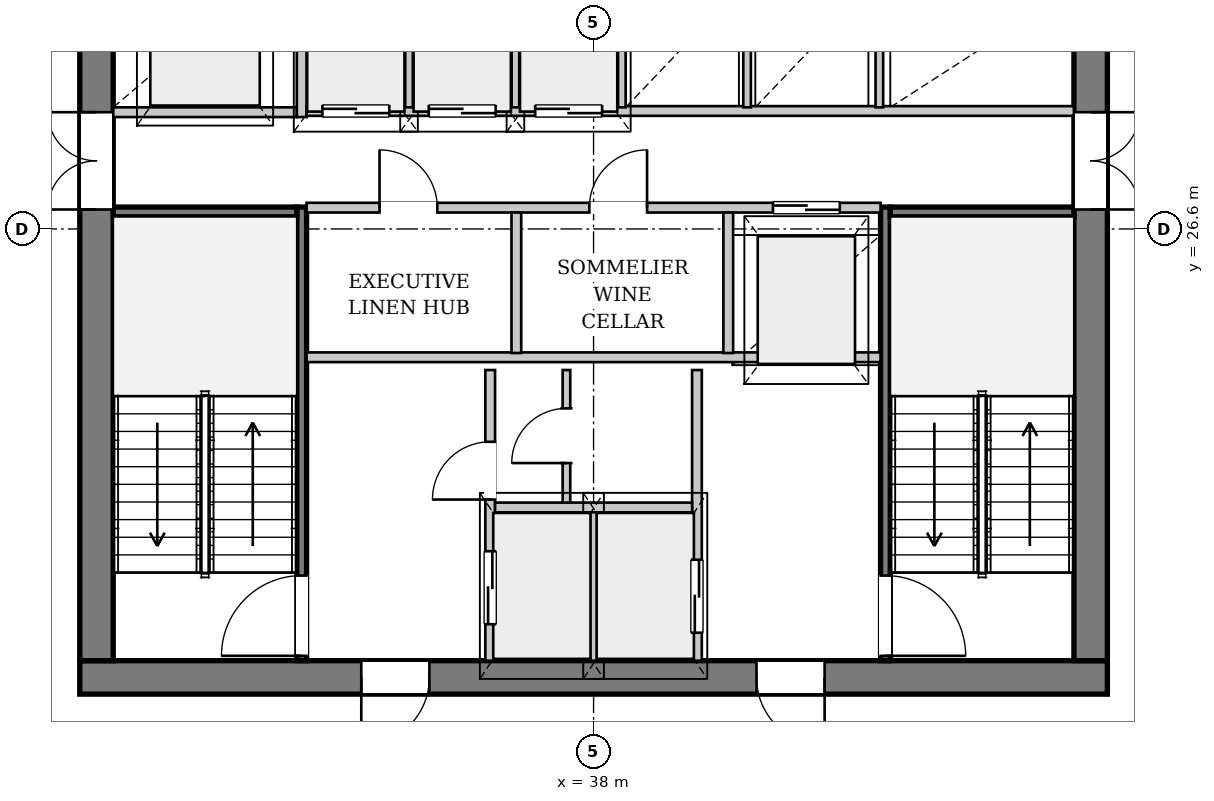
"""IFC4 building model, lengths in metres.
Left out: names, types, materials, properties, quantities, classifications, styles, units other than length and angle.
Written with IfcOpenShell. Run it as: python <this file> out.ifc"""

import sys

from ifc_helpers import new_model, si_unit, direction, frame, frame_2d, origin, place, context, subcontext, project, spatial, rectangle, extrude, source, transform, mapped, element, fill, save


model = new_model("IFC4")
c1 = context("Model", 3, precision=1e-05, world=origin(), true_north=direction((0.0, 1.0)))
c2 = subcontext(c1, "Body", "Model", "MODEL_VIEW")
j1 = project(units=[si_unit("LENGTHUNIT", "METRE"), si_unit("PLANEANGLEUNIT", "RADIAN")], contexts=[c1])
p1 = place(None, origin())
s1 = spatial("IfcSite", under=j1, at=p1, CompositionType="ELEMENT")
p2 = place(p1, origin())
s2 = spatial("IfcBuilding", under=s1, at=p2, CompositionType="ELEMENT")
p3 = place(p2, frame((0.0, 0.0, 157.25)))
s3 = spatial("IfcBuildingStorey", under=s2, at=p3, CompositionType="ELEMENT", Elevation=157.25)
p4 = place(p3, frame((52.85, 18.94, 0.0), z_axis=(0.0, 0.0, 1.0), x_axis=(-0.714884953244, -0.699242092287, 0.0)))
e1 = element("IfcWall", 1, at=p4, inside=s3, PredefinedType="SOLIDWALL", context=c2, shape_type="SweptSolid", body=[
    extrude(rectangle(XDim=23.598, YDim=0.32, at=frame_2d((11.799, 0.0))), origin(), (0.0, 0.0, 1.0), 2.722),
])
p5 = place(p4, frame((6.801, 0.0, 0.0)))
e2 = element("IfcOpeningElement", 2, at=p5, cuts=e1, PredefinedType="OPENING", context=c2, shape_type="SweptSolid", body=[
    extrude(rectangle(XDim=1.5, YDim=2.3, at=frame_2d((0.75, 1.15))), frame((0.0, 0.17, 0.0), z_axis=(0.0, -1.0, 0.0), x_axis=(1.0, 0.0, 0.0)), (0.0, 0.0, 1.0), 0.34),
])
p6 = place(p4, frame((16.163, 0.0, 0.252)))
e3 = element("IfcOpeningElement", 3, at=p6, cuts=e1, PredefinedType="OPENING", context=c2, shape_type="SweptSolid", body=[
    extrude(rectangle(XDim=2.6, YDim=2.35, at=frame_2d((1.3, 1.175))), frame((0.0, 0.17, 0.0), z_axis=(0.0, -1.0, 0.0), x_axis=(1.0, 0.0, 0.0)), (0.0, 0.0, 1.0), 0.34),
])
p7 = place(p3, frame((46.45, 19.225, 0.0), z_axis=(0.0, 0.0, 1.0), x_axis=(-1.0, 0.0, 0.0)))
e4 = element("IfcWall", 4, at=p7, inside=s3, PredefinedType="SHEAR", context=c2, shape_type="SweptSolid", body=[
    extrude(rectangle(XDim=16.9, YDim=0.55, at=frame_2d((8.45, 0.0))), origin(), (0.0, 0.0, 1.0), 3.33),
])
p8 = place(p7, frame((4.65, 0.0, 0.0)))
e5 = element("IfcOpeningElement", 5, at=p8, cuts=e4, PredefinedType="OPENING", context=c2, shape_type="SweptSolid", body=[
    extrude(rectangle(XDim=1.12, YDim=2.25, at=frame_2d((0.56, 1.125))), frame((0.0, 0.285, 0.0), z_axis=(0.0, -1.0, 0.0), x_axis=(1.0, 0.0, 0.0)), (0.0, 0.0, 1.0), 0.57),
])
p9 = place(p7, frame((11.15, 0.0, 0.0)))
e6 = element("IfcOpeningElement", 6, at=p9, cuts=e4, PredefinedType="OPENING", context=c2, shape_type="SweptSolid", body=[
    extrude(rectangle(XDim=1.12, YDim=2.25, at=frame_2d((0.56, 1.125))), frame((0.0, 0.285, 0.0), z_axis=(0.0, -1.0, 0.0), x_axis=(1.0, 0.0, 0.0)), (0.0, 0.0, 1.0), 0.57),
])
p10 = place(p3, frame((29.825, 19.5, 0.0), z_axis=(0.0, 0.0, 1.0), x_axis=(0.0, 1.0, 0.0)))
e7 = element("IfcWall", 7, at=p10, inside=s3, PredefinedType="SHEAR", context=c2, shape_type="SweptSolid", body=[
    extrude(rectangle(XDim=14.2, YDim=0.55, at=frame_2d((7.1, 0.0))), origin(), (0.0, 0.0, 1.0), 3.33),
])
p11 = place(p10, frame((7.42, 0.0, 0.0)))
e8 = element("IfcOpeningElement", 8, at=p11, cuts=e7, PredefinedType="OPENING", context=c2, shape_type="SweptSolid", body=[
    extrude(rectangle(XDim=1.6, YDim=2.2, at=frame_2d((0.8, 1.1))), frame((0.0, 0.285, 0.0), z_axis=(0.0, -1.0, 0.0), x_axis=(1.0, 0.0, 0.0)), (0.0, 0.0, 1.0), 0.57),
])
p12 = place(p3, frame((46.175, 33.7, 0.0), z_axis=(0.0, 0.0, 1.0), x_axis=(0.0, -1.0, 0.0)))
e9 = element("IfcWall", 9, at=p12, inside=s3, PredefinedType="SHEAR", context=c2, shape_type="SweptSolid", body=[
    extrude(rectangle(XDim=14.2, YDim=0.55, at=frame_2d((7.1, 0.0))), origin(), (0.0, 0.0, 1.0), 3.33),
])
p13 = place(p12, frame((5.18, 0.0, 0.0)))
e10 = element("IfcOpeningElement", 10, at=p13, cuts=e9, PredefinedType="OPENING", context=c2, shape_type="SweptSolid", body=[
    extrude(rectangle(XDim=1.6, YDim=2.2, at=frame_2d((0.8, 1.1))), frame((0.0, 0.285, 0.0), z_axis=(0.0, -1.0, 0.0), x_axis=(1.0, 0.0, 0.0)), (0.0, 0.0, 1.0), 0.57),
])
p14 = place(p12, frame((2.05, 0.0, 0.0)))
e11 = element("IfcOpeningElement", 11, at=p14, cuts=e9, PredefinedType="OPENING", context=c2, shape_type="SweptSolid", body=[
    extrude(rectangle(XDim=0.95, YDim=2.1, at=frame_2d((0.475, 1.05))), frame((0.0, 0.285, 0.0), z_axis=(0.0, -1.0, 0.0), x_axis=(1.0, 0.0, 0.0)), (0.0, 0.0, 1.0), 0.57),
])
p15 = place(p3, frame((33.2, 19.5, 0.0), z_axis=(0.0, 0.0, 1.0), x_axis=(0.0, 1.0, 0.0)))
e12 = element("IfcWall", 12, at=p15, inside=s3, PredefinedType="PARTITIONING", context=c2, shape_type="SweptSolid", body=[
    extrude(rectangle(XDim=7.46, YDim=0.16, at=frame_2d((3.73, 0.0))), origin(), (0.0, 0.0, 1.0), 3.33),
])
p16 = place(p15, frame((0.08, 0.0, 0.0)))
e13 = element("IfcOpeningElement", 13, at=p16, cuts=e12, PredefinedType="OPENING", context=c2, shape_type="SweptSolid", body=[
    extrude(rectangle(XDim=1.32, YDim=2.2, at=frame_2d((0.66, 1.1))), frame((0.0, 0.09, 0.0), z_axis=(0.0, -1.0, 0.0), x_axis=(1.0, 0.0, 0.0)), (0.0, 0.0, 1.0), 0.18),
])
p17 = place(p3, frame((30.1, 26.88, 0.0), z_axis=(0.0, 0.0, 1.0), x_axis=(1.0, 0.0, 0.0)))
e14 = element("IfcWall", 14, at=p17, inside=s3, PredefinedType="PARTITIONING", context=c2, shape_type="SweptSolid", body=[
    extrude(rectangle(XDim=3.02, YDim=0.16, at=frame_2d((1.51, 0.0))), origin(), (0.0, 0.0, 1.0), 3.33),
])
p18 = place(p3, frame((42.8, 26.96, 0.0), z_axis=(0.0, 0.0, 1.0), x_axis=(0.0, -1.0, 0.0)))
e15 = element("IfcWall", 15, at=p18, inside=s3, PredefinedType="PARTITIONING", context=c2, shape_type="SweptSolid", body=[
    extrude(rectangle(XDim=7.46, YDim=0.16, at=frame_2d((3.73, 0.0))), origin(), (0.0, 0.0, 1.0), 3.33),
])
p19 = place(p18, frame((6.06, 0.0, 0.0)))
e16 = element("IfcOpeningElement", 16, at=p19, cuts=e15, PredefinedType="OPENING", context=c2, shape_type="SweptSolid", body=[
    extrude(rectangle(XDim=1.32, YDim=2.2, at=frame_2d((0.66, 1.1))), frame((0.0, 0.09, 0.0), z_axis=(0.0, -1.0, 0.0), x_axis=(1.0, 0.0, 0.0)), (0.0, 0.0, 1.0), 0.18),
])
p20 = place(p3, frame((42.88, 26.88, 0.0), z_axis=(0.0, 0.0, 1.0), x_axis=(1.0, 0.0, 0.0)))
e17 = element("IfcWall", 17, at=p20, inside=s3, PredefinedType="PARTITIONING", context=c2, shape_type="SweptSolid", body=[
    extrude(rectangle(XDim=3.02, YDim=0.16, at=frame_2d((1.51, 0.0))), origin(), (0.0, 0.0, 1.0), 3.33),
])
p21 = place(p3, frame((36.3, 19.5, 0.0), z_axis=(0.0, 0.0, 1.0), x_axis=(0.0, 1.0, 0.0)))
e18 = element("IfcWall", 18, at=p21, inside=s3, PredefinedType="PARTITIONING", context=c2, shape_type="SweptSolid", body=[
    extrude(rectangle(XDim=4.78, YDim=0.16, at=frame_2d((2.39, 0.0))), origin(), (0.0, 0.0, 1.0), 3.33),
])
p22 = place(p21, frame((0.6, 0.0, 0.0)))
e19 = element("IfcOpeningElement", 19, at=p22, cuts=e18, PredefinedType="OPENING", context=c2, shape_type="SweptSolid", body=[
    extrude(rectangle(XDim=1.2, YDim=2.2, at=frame_2d((0.6, 1.1))), frame((0.0, 0.09, 0.0), z_axis=(0.0, -1.0, 0.0), x_axis=(1.0, 0.0, 0.0)), (0.0, 0.0, 1.0), 0.18),
])
p23 = place(p21, frame((2.65, 0.0, 0.0)))
e20 = element("IfcOpeningElement", 20, at=p23, cuts=e18, PredefinedType="OPENING", context=c2, shape_type="SweptSolid", body=[
    extrude(rectangle(XDim=0.95, YDim=2.1, at=frame_2d((0.475, 1.05))), frame((0.0, 0.09, 0.0), z_axis=(0.0, -1.0, 0.0), x_axis=(1.0, 0.0, 0.0)), (0.0, 0.0, 1.0), 0.18),
])
p24 = place(p3, frame((39.7, 24.28, 0.0), z_axis=(0.0, 0.0, 1.0), x_axis=(0.0, -1.0, 0.0)))
e21 = element("IfcWall", 21, at=p24, inside=s3, PredefinedType="PARTITIONING", context=c2, shape_type="SweptSolid", body=[
    extrude(rectangle(XDim=4.78, YDim=0.16, at=frame_2d((2.39, 0.0))), origin(), (0.0, 0.0, 1.0), 3.33),
])
p25 = place(p24, frame((3.12, 0.0, 0.0)))
e22 = element("IfcOpeningElement", 22, at=p25, cuts=e21, PredefinedType="OPENING", context=c2, shape_type="SweptSolid", body=[
    extrude(rectangle(XDim=1.2, YDim=2.2, at=frame_2d((0.6, 1.1))), frame((0.0, 0.09, 0.0), z_axis=(0.0, -1.0, 0.0), x_axis=(1.0, 0.0, 0.0)), (0.0, 0.0, 1.0), 0.18),
])
p26 = place(p3, frame((38.0, 19.5, 0.0), z_axis=(0.0, 0.0, 1.0), x_axis=(0.0, 1.0, 0.0)))
e23 = element("IfcWall", 23, at=p26, inside=s3, PredefinedType="PARTITIONING", context=c2, shape_type="SweptSolid", body=[
    extrude(rectangle(XDim=2.46, YDim=0.125, at=frame_2d((1.23, 0.0))), origin(), (0.0, 0.0, 1.0), 3.33),
])
p27 = place(p3, frame((36.38, 22.02, 0.0), z_axis=(0.0, 0.0, 1.0), x_axis=(1.0, 0.0, 0.0)))
e24 = element("IfcWall", 24, at=p27, inside=s3, PredefinedType="PARTITIONING", context=c2, shape_type="SweptSolid", body=[
    extrude(rectangle(XDim=3.24, YDim=0.16, at=frame_2d((1.62, 0.0))), origin(), (0.0, 0.0, 1.0), 3.33),
])
p28 = place(p3, frame((33.28, 24.49, 0.0), z_axis=(0.0, 0.0, 1.0), x_axis=(1.0, 0.0, 0.0)))
e25 = element("IfcWall", 25, at=p28, inside=s3, PredefinedType="PARTITIONING", context=c2, shape_type="SweptSolid", body=[
    extrude(rectangle(XDim=9.44, YDim=0.16, at=frame_2d((4.72, 0.0))), origin(), (0.0, 0.0, 1.0), 3.33),
])
p29 = place(p3, frame((37.554, 22.1, 0.0), z_axis=(0.0, 0.0, 1.0), x_axis=(0.0, 1.0, 0.0)))
e26 = element("IfcWall", 26, at=p29, inside=s3, PredefinedType="PARTITIONING", context=c2, shape_type="SweptSolid", body=[
    extrude(rectangle(XDim=2.18, YDim=0.125, at=frame_2d((1.09, 0.0))), origin(), (0.0, 0.0, 1.0), 3.33),
])
p30 = place(p29, frame((0.65, 0.0, 0.0)))
e27 = element("IfcOpeningElement", 27, at=p30, cuts=e26, PredefinedType="OPENING", context=c2, shape_type="SweptSolid", body=[
    extrude(rectangle(XDim=0.9, YDim=2.1, at=frame_2d((0.45, 1.05))), frame((0.0, 0.073, 0.0), z_axis=(0.0, -1.0, 0.0), x_axis=(1.0, 0.0, 0.0)), (0.0, 0.0, 1.0), 0.145),
])
p31 = place(p3, frame((30.1, 28.52, 0.0), z_axis=(0.0, 0.0, 1.0), x_axis=(1.0, 0.0, 0.0)))
e28 = element("IfcWall", 28, at=p31, inside=s3, PredefinedType="PARTITIONING", context=c2, shape_type="SweptSolid", body=[
    extrude(rectangle(XDim=3.02, YDim=0.16, at=frame_2d((1.51, 0.0))), origin(), (0.0, 0.0, 1.0), 3.33),
])
p32 = place(p3, frame((33.2, 28.44, 0.0), z_axis=(0.0, 0.0, 1.0), x_axis=(0.0, 1.0, 0.0)))
e29 = element("IfcWall", 29, at=p32, inside=s3, PredefinedType="PARTITIONING", context=c2, shape_type="SweptSolid", body=[
    extrude(rectangle(XDim=5.26, YDim=0.16, at=frame_2d((2.63, 0.0))), origin(), (0.0, 0.0, 1.0), 3.33),
])
p33 = place(p3, frame((33.28, 26.95, 0.0), z_axis=(0.0, 0.0, 1.0), x_axis=(1.0, 0.0, 0.0)))
e30 = element("IfcWall", 30, at=p33, inside=s3, PredefinedType="PARTITIONING", context=c2, shape_type="SweptSolid", body=[
    extrude(rectangle(XDim=9.44, YDim=0.16, at=frame_2d((4.72, 0.0))), origin(), (0.0, 0.0, 1.0), 3.33),
])
p34 = place(p33, frame((1.2, 0.0, 0.0)))
e31 = element("IfcOpeningElement", 31, at=p34, cuts=e30, PredefinedType="OPENING", context=c2, shape_type="SweptSolid", body=[
    extrude(rectangle(XDim=0.95, YDim=2.1, at=frame_2d((0.475, 1.05))), frame((0.0, 0.09, 0.0), z_axis=(0.0, -1.0, 0.0), x_axis=(1.0, 0.0, 0.0)), (0.0, 0.0, 1.0), 0.18),
])
p35 = place(p33, frame((4.65, 0.0, 0.0)))
e32 = element("IfcOpeningElement", 32, at=p35, cuts=e30, PredefinedType="OPENING", context=c2, shape_type="SweptSolid", body=[
    extrude(rectangle(XDim=0.95, YDim=2.1, at=frame_2d((0.475, 1.05))), frame((0.0, 0.09, 0.0), z_axis=(0.0, -1.0, 0.0), x_axis=(1.0, 0.0, 0.0)), (0.0, 0.0, 1.0), 0.18),
])
p36 = place(p33, frame((7.67, 0.0, 0.0)))
e33 = element("IfcOpeningElement", 33, at=p36, cuts=e30, PredefinedType="OPENING", context=c2, shape_type="SweptSolid", body=[
    extrude(rectangle(XDim=1.1, YDim=2.2, at=frame_2d((0.55, 1.1))), frame((0.0, 0.09, 0.0), z_axis=(0.0, -1.0, 0.0), x_axis=(1.0, 0.0, 0.0)), (0.0, 0.0, 1.0), 0.18),
])
for number, where, z_axis, x_axis in (
    (34, (36.73, 24.56, 0.0), (0.0, 0.0, 1.0), (0.0, 1.0, 0.0)),
    (35, (40.215, 24.56, 0.0), (0.0, 0.0, 1.0), (0.0, 1.0, 0.0)),
):
    element("IfcWall", number, at=place(p3, frame(where, z_axis=z_axis, x_axis=x_axis)), inside=s3, PredefinedType="PARTITIONING", context=c2, shape_type="SweptSolid", body=[
        extrude(rectangle(XDim=2.31, YDim=0.16, at=frame_2d((1.155, 0.0))), origin(), (0.0, 0.0, 1.0), 3.33),
    ])
p37 = place(p3, frame((33.28, 28.54, 0.0), z_axis=(0.0, 0.0, 1.0), x_axis=(1.0, 0.0, 0.0)))
e36 = element("IfcWall", 36, at=p37, inside=s3, PredefinedType="PARTITIONING", context=c2, shape_type="SweptSolid", body=[
    extrude(rectangle(XDim=12.62, YDim=0.16, at=frame_2d((6.31, 0.0))), origin(), (0.0, 0.0, 1.0), 3.33),
])
p38 = place(p37, frame((0.26, 0.0, 0.0)))
e37 = element("IfcOpeningElement", 37, at=p38, cuts=e36, PredefinedType="OPENING", context=c2, shape_type="SweptSolid", body=[
    extrude(rectangle(XDim=1.1, YDim=2.2, at=frame_2d((0.55, 1.1))), frame((0.0, 0.09, 0.0), z_axis=(0.0, -1.0, 0.0), x_axis=(1.0, 0.0, 0.0)), (0.0, 0.0, 1.0), 0.18),
])
p39 = place(p37, frame((2.01, 0.0, 0.0)))
e38 = element("IfcOpeningElement", 38, at=p39, cuts=e36, PredefinedType="OPENING", context=c2, shape_type="SweptSolid", body=[
    extrude(rectangle(XDim=1.1, YDim=2.2, at=frame_2d((0.55, 1.1))), frame((0.0, 0.09, 0.0), z_axis=(0.0, -1.0, 0.0), x_axis=(1.0, 0.0, 0.0)), (0.0, 0.0, 1.0), 0.18),
])
p40 = place(p37, frame((3.76, 0.0, 0.0)))
e39 = element("IfcOpeningElement", 39, at=p40, cuts=e36, PredefinedType="OPENING", context=c2, shape_type="SweptSolid", body=[
    extrude(rectangle(XDim=1.1, YDim=2.2, at=frame_2d((0.55, 1.1))), frame((0.0, 0.09, 0.0), z_axis=(0.0, -1.0, 0.0), x_axis=(1.0, 0.0, 0.0)), (0.0, 0.0, 1.0), 0.18),
])
for number, where, z_axis, x_axis in (
    (40, (34.965, 28.6, 0.0), (0.0, 0.0, 1.0), (0.0, 1.0, 0.0)),
    (41, (36.715, 28.6, 0.0), (0.0, 0.0, 1.0), (0.0, 1.0, 0.0)),
    (42, (38.465, 28.6, 0.0), (0.0, 0.0, 1.0), (0.0, 1.0, 0.0)),
    (43, (40.525, 28.6, 0.0), (0.0, 0.0, 1.0), (0.0, 1.0, 0.0)),
    (44, (42.7, 28.6, 0.0), (0.0, 0.0, 1.0), (0.0, 1.0, 0.0)),
):
    element("IfcWall", number, at=place(p3, frame(where, z_axis=z_axis, x_axis=x_axis)), inside=s3, PredefinedType="PARTITIONING", context=c2, shape_type="SweptSolid", body=[
        extrude(rectangle(XDim=1.92, YDim=0.125, at=frame_2d((0.96, 0.0))), origin(), (0.0, 0.0, 1.0), 3.33),
    ])
m1 = source(origin(), c2, "Body", "SweptSolid", [
    extrude(rectangle(XDim=1.12, YDim=2.25, at=frame_2d((0.56, 1.125))), frame((0.0, 0.025, 0.0), z_axis=(0.0, -1.0, 0.0), x_axis=(1.0, 0.0, 0.0)), (0.0, 0.0, 1.0), 0.05),
])
p41 = place(p8, origin())
e45 = element("IfcDoor", 45, at=p41, inside=s3, OperationType="SINGLE_SWING_LEFT", PredefinedType="DOOR", context=c2, shape_type="MappedRepresentation", body=[
    mapped(m1, transform((0.0, 0.0, 0.0), x_axis=(1.0, 0.0, 0.0), y_axis=(0.0, 1.0, 0.0), z_axis=(0.0, 0.0, 1.0), scale=1.0)),
])
fill(e5, e45)
p42 = place(p9, origin())
e46 = element("IfcDoor", 46, at=p42, inside=s3, OperationType="SINGLE_SWING_RIGHT", PredefinedType="DOOR", context=c2, shape_type="MappedRepresentation", body=[
    mapped(m1, transform((0.0, 0.0, 0.0), x_axis=(1.0, 0.0, 0.0), y_axis=(0.0, 1.0, 0.0), z_axis=(0.0, 0.0, 1.0), scale=1.0)),
])
fill(e6, e46)
m2 = source(origin(), c2, "Body", "SweptSolid", [
    extrude(rectangle(XDim=1.6, YDim=2.2, at=frame_2d((0.8, 1.1))), frame((0.0, 0.025, 0.0), z_axis=(0.0, -1.0, 0.0), x_axis=(1.0, 0.0, 0.0)), (0.0, 0.0, 1.0), 0.05),
])
p43 = place(p11, origin())
e47 = element("IfcDoor", 47, at=p43, inside=s3, OperationType="DOUBLE_DOOR_SINGLE_SWING", PredefinedType="DOOR", context=c2, shape_type="MappedRepresentation", body=[
    mapped(m2, transform((0.0, 0.0, 0.0), x_axis=(1.0, 0.0, 0.0), y_axis=(0.0, 1.0, 0.0), z_axis=(0.0, 0.0, 1.0), scale=1.0)),
])
fill(e8, e47)
p44 = place(p13, origin())
e48 = element("IfcDoor", 48, at=p44, inside=s3, OperationType="DOUBLE_DOOR_SINGLE_SWING", PredefinedType="DOOR", context=c2, shape_type="MappedRepresentation", body=[
    mapped(m2, transform((0.0, 0.0, 0.0), x_axis=(1.0, 0.0, 0.0), y_axis=(0.0, 1.0, 0.0), z_axis=(0.0, 0.0, 1.0), scale=1.0)),
])
fill(e10, e48)
m3 = source(origin(), c2, "Body", "SweptSolid", [
    extrude(rectangle(XDim=1.32, YDim=2.2, at=frame_2d((0.66, 1.1))), frame((0.0, 0.025, 0.0), z_axis=(0.0, -1.0, 0.0), x_axis=(1.0, 0.0, 0.0)), (0.0, 0.0, 1.0), 0.05),
])
p45 = place(p16, origin())
e49 = element("IfcDoor", 49, at=p45, inside=s3, OperationType="SINGLE_SWING_LEFT", PredefinedType="DOOR", context=c2, shape_type="MappedRepresentation", body=[
    mapped(m3, transform((0.0, 0.0, 0.0), x_axis=(1.0, 0.0, 0.0), y_axis=(0.0, 1.0, 0.0), z_axis=(0.0, 0.0, 1.0), scale=1.0)),
])
fill(e13, e49)
p46 = place(p19, origin())
e50 = element("IfcDoor", 50, at=p46, inside=s3, OperationType="SINGLE_SWING_RIGHT", PredefinedType="DOOR", context=c2, shape_type="MappedRepresentation", body=[
    mapped(m3, transform((0.0, 0.0, 0.0), x_axis=(1.0, 0.0, 0.0), y_axis=(0.0, 1.0, 0.0), z_axis=(0.0, 0.0, 1.0), scale=1.0)),
])
fill(e16, e50)
m4 = source(origin(), c2, "Body", "SweptSolid", [
    extrude(rectangle(XDim=1.2, YDim=2.2, at=frame_2d((0.6, 1.1))), frame((0.0, 0.025, 0.0), z_axis=(0.0, -1.0, 0.0), x_axis=(1.0, 0.0, 0.0)), (0.0, 0.0, 1.0), 0.05),
])
p47 = place(p22, origin())
e51 = element("IfcDoor", 51, at=p47, inside=s3, OperationType="DOUBLE_DOOR_SLIDING", PredefinedType="DOOR", context=c2, shape_type="MappedRepresentation", body=[
    mapped(m4, transform((0.0, 0.0, 0.0), x_axis=(1.0, 0.0, 0.0), y_axis=(0.0, 1.0, 0.0), z_axis=(0.0, 0.0, 1.0), scale=1.0)),
])
fill(e19, e51)
m5 = source(origin(), c2, "Body", "SweptSolid", [
    extrude(rectangle(XDim=0.95, YDim=2.1, at=frame_2d((0.475, 1.05))), frame((0.0, 0.025, 0.0), z_axis=(0.0, -1.0, 0.0), x_axis=(1.0, 0.0, 0.0)), (0.0, 0.0, 1.0), 0.05),
])
p48 = place(p23, origin())
e52 = element("IfcDoor", 52, at=p48, inside=s3, OperationType="SINGLE_SWING_LEFT", PredefinedType="DOOR", context=c2, shape_type="MappedRepresentation", body=[
    mapped(m5, transform((0.0, 0.0, 0.0), x_axis=(1.0, 0.0, 0.0), y_axis=(0.0, 1.0, 0.0), z_axis=(0.0, 0.0, 1.0), scale=1.0)),
])
fill(e20, e52)
m6 = source(origin(), c2, "Body", "SweptSolid", [
    extrude(rectangle(XDim=0.9, YDim=2.1, at=frame_2d((0.45, 1.05))), frame((0.0, 0.025, 0.0), z_axis=(0.0, -1.0, 0.0), x_axis=(1.0, 0.0, 0.0)), (0.0, 0.0, 1.0), 0.05),
])
p49 = place(p30, origin())
e53 = element("IfcDoor", 53, at=p49, inside=s3, OperationType="SINGLE_SWING_LEFT", PredefinedType="DOOR", context=c2, shape_type="MappedRepresentation", body=[
    mapped(m6, transform((0.0, 0.0, 0.0), x_axis=(1.0, 0.0, 0.0), y_axis=(0.0, 1.0, 0.0), z_axis=(0.0, 0.0, 1.0), scale=1.0)),
])
fill(e27, e53)
p50 = place(p25, origin())
e54 = element("IfcDoor", 54, at=p50, inside=s3, OperationType="DOUBLE_DOOR_SLIDING", PredefinedType="DOOR", context=c2, shape_type="MappedRepresentation", body=[
    mapped(m4, transform((0.0, 0.0, 0.0), x_axis=(1.0, 0.0, 0.0), y_axis=(0.0, 1.0, 0.0), z_axis=(0.0, 0.0, 1.0), scale=1.0)),
])
fill(e22, e54)
p51 = place(p34, origin())
e55 = element("IfcDoor", 55, at=p51, inside=s3, OperationType="SINGLE_SWING_LEFT", PredefinedType="DOOR", context=c2, shape_type="MappedRepresentation", body=[
    mapped(m5, transform((0.0, 0.0, 0.0), x_axis=(1.0, 0.0, 0.0), y_axis=(0.0, 1.0, 0.0), z_axis=(0.0, 0.0, 1.0), scale=1.0)),
])
fill(e31, e55)
p52 = place(p35, origin())
e56 = element("IfcDoor", 56, at=p52, inside=s3, OperationType="SINGLE_SWING_RIGHT", PredefinedType="DOOR", context=c2, shape_type="MappedRepresentation", body=[
    mapped(m5, transform((0.0, 0.0, 0.0), x_axis=(1.0, 0.0, 0.0), y_axis=(0.0, 1.0, 0.0), z_axis=(0.0, 0.0, 1.0), scale=1.0)),
])
fill(e32, e56)
m7 = source(origin(), c2, "Body", "SweptSolid", [
    extrude(rectangle(XDim=1.1, YDim=2.2, at=frame_2d((0.55, 1.1))), frame((0.0, 0.025, 0.0), z_axis=(0.0, -1.0, 0.0), x_axis=(1.0, 0.0, 0.0)), (0.0, 0.0, 1.0), 0.05),
])
p53 = place(p36, origin())
e57 = element("IfcDoor", 57, at=p53, inside=s3, OperationType="DOUBLE_DOOR_SLIDING", PredefinedType="DOOR", context=c2, shape_type="MappedRepresentation", body=[
    mapped(m7, transform((0.0, 0.0, 0.0), x_axis=(1.0, 0.0, 0.0), y_axis=(0.0, 1.0, 0.0), z_axis=(0.0, 0.0, 1.0), scale=1.0)),
])
fill(e33, e57)
p54 = place(p38, origin())
e58 = element("IfcDoor", 58, at=p54, inside=s3, OperationType="DOUBLE_DOOR_SLIDING", PredefinedType="DOOR", context=c2, shape_type="MappedRepresentation", body=[
    mapped(m7, transform((0.0, 0.0, 0.0), x_axis=(1.0, 0.0, 0.0), y_axis=(0.0, 1.0, 0.0), z_axis=(0.0, 0.0, 1.0), scale=1.0)),
])
fill(e37, e58)
p55 = place(p39, origin())
e59 = element("IfcDoor", 59, at=p55, inside=s3, OperationType="DOUBLE_DOOR_SLIDING", PredefinedType="DOOR", context=c2, shape_type="MappedRepresentation", body=[
    mapped(m7, transform((0.0, 0.0, 0.0), x_axis=(1.0, 0.0, 0.0), y_axis=(0.0, 1.0, 0.0), z_axis=(0.0, 0.0, 1.0), scale=1.0)),
])
fill(e38, e59)
p56 = place(p40, origin())
e60 = element("IfcDoor", 60, at=p56, inside=s3, OperationType="DOUBLE_DOOR_SLIDING", PredefinedType="DOOR", context=c2, shape_type="MappedRepresentation", body=[
    mapped(m7, transform((0.0, 0.0, 0.0), x_axis=(1.0, 0.0, 0.0), y_axis=(0.0, 1.0, 0.0), z_axis=(0.0, 0.0, 1.0), scale=1.0)),
])
fill(e39, e60)
save(model, sys.argv[1])
